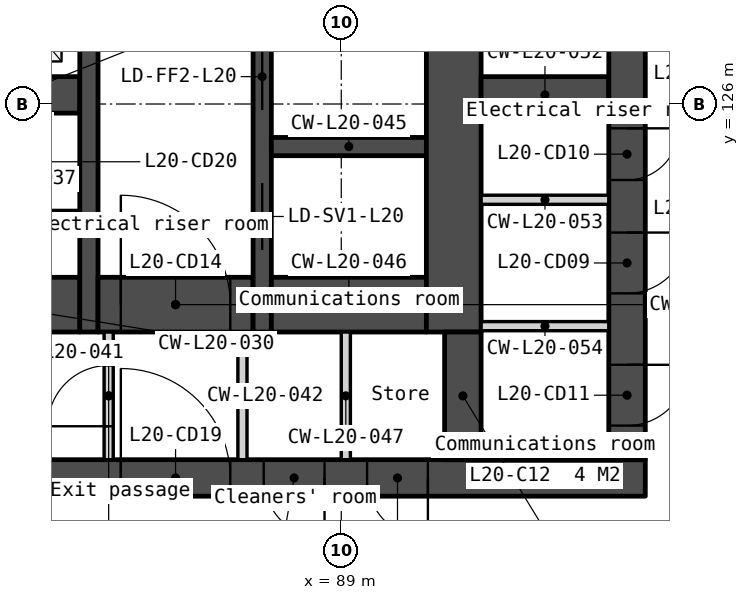
"""IFC4 building model, lengths in metres.
Left out: names, types, materials, properties, quantities, classifications, styles, units other than length and angle.
Written with IfcOpenShell. Run it as: python <this file> out.ifc"""

import sys

from ifc_helpers import new_model, si_unit, direction, frame, frame_2d, origin, place, context, subcontext, project, spatial, polyline, rectangle, outline, extrude, element, fill, save


model = new_model("IFC4")
c1 = context("Model", 3, precision=1e-05, world=origin(), true_north=direction((0.0, 1.0)))
c2 = subcontext(c1, "Body", "Model", "MODEL_VIEW")
j1 = project(units=[si_unit("LENGTHUNIT", "METRE"), si_unit("PLANEANGLEUNIT", "RADIAN")], contexts=[c1])
p1 = place(None, origin())
s1 = spatial("IfcSite", under=j1, at=p1, CompositionType="ELEMENT")
p2 = place(p1, origin())
s2 = spatial("IfcBuilding", under=s1, at=p2, CompositionType="ELEMENT")
p3 = place(p2, frame((0.0, 0.0, 85.3)))
s3 = spatial("IfcBuildingStorey", under=s2, at=p3, CompositionType="ELEMENT", Elevation=85.3)
p4 = place(p3, frame((66.0, 119.85, 0.0), z_axis=(0.0, 0.0, 1.0), x_axis=(1.0, 0.0, 0.0)))
e1 = element("IfcWall", 1, at=p4, inside=s3, PredefinedType="SOLIDWALL", context=c2, shape_type="SweptSolid", body=[
    extrude(rectangle(XDim=28.0, YDim=0.6, at=frame_2d((14.0, 0.0))), origin(), (0.0, 0.0, 1.0), 3.35),
])
p5 = place(p4, frame((6.825, 0.0, 0.0)))
e2 = element("IfcOpeningElement", 2, at=p5, cuts=e1, PredefinedType="OPENING", context=c2, shape_type="SweptSolid", body=[
    extrude(rectangle(XDim=1.8, YDim=2.1, at=frame_2d((0.9, 1.05))), frame((0.0, 0.31, 0.0), z_axis=(0.0, -1.0, 0.0), x_axis=(1.0, 0.0, 0.0)), (0.0, 0.0, 1.0), 0.62),
])
p6 = place(p4, frame((15.85, 0.0, 0.0)))
e3 = element("IfcOpeningElement", 3, at=p6, cuts=e1, PredefinedType="OPENING", context=c2, shape_type="SweptSolid", body=[
    extrude(rectangle(XDim=1.5, YDim=2.1, at=frame_2d((0.75, 1.05))), frame((0.0, 0.31, 0.0), z_axis=(0.0, -1.0, 0.0), x_axis=(1.0, 0.0, 0.0)), (0.0, 0.0, 1.0), 0.62),
])
p7 = place(p4, frame((19.375, 0.0, 0.0)))
e4 = element("IfcOpeningElement", 4, at=p7, cuts=e1, PredefinedType="OPENING", context=c2, shape_type="SweptSolid", body=[
    extrude(rectangle(XDim=1.8, YDim=2.1, at=frame_2d((0.9, 1.05))), frame((0.0, 0.31, 0.0), z_axis=(0.0, -1.0, 0.0), x_axis=(1.0, 0.0, 0.0)), (0.0, 0.0, 1.0), 0.62),
])
p8 = place(p4, frame((4.425, 0.0, 0.0)))
e5 = element("IfcOpeningElement", 5, at=p8, cuts=e1, PredefinedType="OPENING", context=c2, shape_type="SweptSolid", body=[
    extrude(rectangle(XDim=1.0, YDim=2.1, at=frame_2d((0.5, 1.05))), frame((0.0, 0.31, 0.0), z_axis=(0.0, -1.0, 0.0), x_axis=(1.0, 0.0, 0.0)), (0.0, 0.0, 1.0), 0.62),
])
p9 = place(p4, frame((9.783, 0.0, 0.0)))
e6 = element("IfcOpeningElement", 6, at=p9, cuts=e1, PredefinedType="OPENING", context=c2, shape_type="SweptSolid", body=[
    extrude(rectangle(XDim=1.0, YDim=2.1, at=frame_2d((0.5, 1.05))), frame((0.0, 0.31, 0.0), z_axis=(0.0, -1.0, 0.0), x_axis=(1.0, 0.0, 0.0)), (0.0, 0.0, 1.0), 0.62),
])
p10 = place(p4, frame((11.525, 0.0, 0.0)))
e7 = element("IfcOpeningElement", 7, at=p10, cuts=e1, PredefinedType="OPENING", context=c2, shape_type="SweptSolid", body=[
    extrude(rectangle(XDim=1.0, YDim=2.1, at=frame_2d((0.5, 1.05))), frame((0.0, 0.31, 0.0), z_axis=(0.0, -1.0, 0.0), x_axis=(1.0, 0.0, 0.0)), (0.0, 0.0, 1.0), 0.62),
])
p11 = place(p4, frame((13.658, 0.0, 0.0)))
e8 = element("IfcOpeningElement", 8, at=p11, cuts=e1, PredefinedType="OPENING", context=c2, shape_type="SweptSolid", body=[
    extrude(rectangle(XDim=1.0, YDim=2.1, at=frame_2d((0.5, 1.05))), frame((0.0, 0.31, 0.0), z_axis=(0.0, -1.0, 0.0), x_axis=(1.0, 0.0, 0.0)), (0.0, 0.0, 1.0), 0.62),
])
p12 = place(p4, frame((21.725, 0.0, 0.0)))
e9 = element("IfcOpeningElement", 9, at=p12, cuts=e1, PredefinedType="OPENING", context=c2, shape_type="SweptSolid", body=[
    extrude(rectangle(XDim=1.0, YDim=2.1, at=frame_2d((0.5, 1.05))), frame((0.0, 0.31, 0.0), z_axis=(0.0, -1.0, 0.0), x_axis=(1.0, 0.0, 0.0)), (0.0, 0.0, 1.0), 0.62),
])
p13 = place(p4, frame((23.425, 0.0, 0.0)))
e10 = element("IfcOpeningElement", 10, at=p13, cuts=e1, PredefinedType="OPENING", context=c2, shape_type="SweptSolid", body=[
    extrude(rectangle(XDim=1.0, YDim=2.1, at=frame_2d((0.5, 1.05))), frame((0.0, 0.31, 0.0), z_axis=(0.0, -1.0, 0.0), x_axis=(1.0, 0.0, 0.0)), (0.0, 0.0, 1.0), 0.62),
])
p14 = place(p3, frame((81.8, 122.7, 0.0), z_axis=(0.0, 0.0, 1.0), x_axis=(1.0, 0.0, 0.0)))
e11 = element("IfcWall", 11, at=p14, inside=s3, PredefinedType="SOLIDWALL", context=c2, shape_type="SweptSolid", body=[
    extrude(rectangle(XDim=2.9, YDim=0.9, at=frame_2d((1.45, 0.0))), origin(), (0.0, 0.0, 1.0), 3.35),
])
p15 = place(p14, frame((0.05, 0.0, 0.0)))
e12 = element("IfcOpeningElement", 12, at=p15, cuts=e11, PredefinedType="OPENING", context=c2, shape_type="SweptSolid", body=[
    extrude(rectangle(XDim=1.5, YDim=2.1, at=frame_2d((0.75, 1.05))), frame((0.0, 0.46, 0.0), z_axis=(0.0, -1.0, 0.0), x_axis=(1.0, 0.0, 0.0)), (0.0, 0.0, 1.0), 0.92),
])
p16 = place(p3, frame((82.6, 126.15, 0.0), z_axis=(0.0, 0.0, 1.0), x_axis=(1.0, 0.0, 0.0)))
e13 = element("IfcWall", 13, at=p16, inside=s3, PredefinedType="SOLIDWALL", context=c2, shape_type="SweptSolid", body=[
    extrude(rectangle(XDim=2.1, YDim=0.6, at=frame_2d((1.05, 0.0))), origin(), (0.0, 0.0, 1.0), 3.35),
])
p17 = place(p3, frame((83.35, 124.175, 0.0), z_axis=(0.0, 0.0, 1.0), x_axis=(1.0, 0.0, 0.0)))
e14 = element("IfcWall", 14, at=p17, inside=s3, PredefinedType="PARTITIONING", context=c2, shape_type="SweptSolid", body=[
    extrude(rectangle(XDim=1.35, YDim=0.15, at=frame_2d((0.675, 0.0))), origin(), (0.0, 0.0, 1.0), 3.35),
])
p18 = place(p3, frame((84.85, 133.95, 0.0), z_axis=(0.0, 0.0, 1.0), x_axis=(0.0, -1.0, 0.0)))
e15 = element("IfcWall", 15, at=p18, inside=s3, PredefinedType="SOLIDWALL", context=c2, shape_type="SweptSolid", body=[
    extrude(rectangle(XDim=11.7, YDim=0.3, at=frame_2d((5.85, 0.0))), origin(), (0.0, 0.0, 1.0), 3.35),
])
p19 = place(p3, frame((85.0, 122.7, 0.0), z_axis=(0.0, 0.0, 1.0), x_axis=(1.0, 0.0, 0.0)))
e16 = element("IfcWall", 16, at=p19, inside=s3, PredefinedType="SOLIDWALL", context=c2, shape_type="SweptSolid", body=[
    extrude(rectangle(XDim=2.55, YDim=0.9, at=frame_2d((1.275, 0.0))), origin(), (0.0, 0.0, 1.0), 3.35),
])
p20 = place(p19, frame((0.375, 0.0, 0.0)))
e17 = element("IfcOpeningElement", 17, at=p20, cuts=e16, PredefinedType="OPENING", context=c2, shape_type="SweptSolid", body=[
    extrude(rectangle(XDim=1.8, YDim=2.1, at=frame_2d((0.9, 1.05))), frame((0.0, 0.46, 0.0), z_axis=(0.0, -1.0, 0.0), x_axis=(1.0, 0.0, 0.0)), (0.0, 0.0, 1.0), 0.92),
])
p21 = place(p3, frame((85.175, 122.25, 0.0), z_axis=(0.0, 0.0, 1.0), x_axis=(0.0, -1.0, 0.0)))
e18 = element("IfcWall", 18, at=p21, inside=s3, PredefinedType="PARTITIONING", context=c2, shape_type="SweptSolid", body=[
    extrude(rectangle(XDim=2.1, YDim=0.15, at=frame_2d((1.05, 0.0))), origin(), (0.0, 0.0, 1.0), 3.35),
])
p22 = place(p21, frame((0.55, 0.0, 0.0)))
e19 = element("IfcOpeningElement", 19, at=p22, cuts=e18, PredefinedType="OPENING", context=c2, shape_type="SweptSolid", body=[
    extrude(rectangle(XDim=1.0, YDim=2.1, at=frame_2d((0.5, 1.05))), frame((0.0, 0.085, 0.0), z_axis=(0.0, -1.0, 0.0), x_axis=(1.0, 0.0, 0.0)), (0.0, 0.0, 1.0), 0.17),
])
p23 = place(p3, frame((87.375, 122.25, 0.0), z_axis=(0.0, 0.0, 1.0), x_axis=(0.0, -1.0, 0.0)))
e20 = element("IfcWall", 20, at=p23, inside=s3, PredefinedType="PARTITIONING", context=c2, shape_type="SweptSolid", body=[
    extrude(rectangle(XDim=2.1, YDim=0.15, at=frame_2d((1.05, 0.0))), origin(), (0.0, 0.0, 1.0), 3.35),
])
p24 = place(p3, frame((87.7, 133.95, 0.0), z_axis=(0.0, 0.0, 1.0), x_axis=(0.0, -1.0, 0.0)))
e21 = element("IfcWall", 21, at=p24, inside=s3, PredefinedType="SOLIDWALL", context=c2, shape_type="SweptSolid", body=[
    extrude(rectangle(XDim=11.7, YDim=0.3, at=frame_2d((5.85, 0.0))), origin(), (0.0, 0.0, 1.0), 3.35),
])
p25 = place(p24, frame((6.95, 0.0, 0.0)))
e22 = element("IfcOpeningElement", 22, at=p25, cuts=e21, PredefinedType="OPENING", context=c2, shape_type="SweptSolid", body=[
    extrude(rectangle(XDim=1.1, YDim=2.1, at=frame_2d((0.55, 1.05))), frame((0.0, 0.16, 0.0), z_axis=(0.0, -1.0, 0.0), x_axis=(1.0, 0.0, 0.0)), (0.0, 0.0, 1.0), 0.32),
])
p26 = place(p24, frame((5.1, 0.0, 0.0)))
e23 = element("IfcOpeningElement", 23, at=p26, cuts=e21, PredefinedType="OPENING", context=c2, shape_type="SweptSolid", body=[
    extrude(rectangle(XDim=1.0, YDim=2.1, at=frame_2d((0.5, 1.05))), frame((0.0, 0.16, 0.0), z_axis=(0.0, -1.0, 0.0), x_axis=(1.0, 0.0, 0.0)), (0.0, 0.0, 1.0), 0.32),
])
p27 = place(p24, frame((9.25, 0.0, 0.0)))
e24 = element("IfcOpeningElement", 24, at=p27, cuts=e21, PredefinedType="OPENING", context=c2, shape_type="SweptSolid", body=[
    extrude(rectangle(XDim=1.1, YDim=2.1, at=frame_2d((0.55, 1.05))), frame((0.0, 0.16, 0.0), z_axis=(0.0, -1.0, 0.0), x_axis=(1.0, 0.0, 0.0)), (0.0, 0.0, 1.0), 0.32),
])
p28 = place(p3, frame((87.85, 125.3, 0.0), z_axis=(0.0, 0.0, 1.0), x_axis=(1.0, 0.0, 0.0)))
e25 = element("IfcWall", 25, at=p28, inside=s3, PredefinedType="SOLIDWALL", context=c2, shape_type="SweptSolid", body=[
    extrude(rectangle(XDim=2.55, YDim=0.3, at=frame_2d((1.275, 0.0))), origin(), (0.0, 0.0, 1.0), 3.35),
])
p29 = place(p3, frame((87.85, 122.7, 0.0), z_axis=(0.0, 0.0, 1.0), x_axis=(1.0, 0.0, 0.0)))
e26 = element("IfcWall", 26, at=p29, inside=s3, PredefinedType="SOLIDWALL", context=c2, shape_type="SweptSolid", body=[
    extrude(rectangle(XDim=2.55, YDim=0.9, at=frame_2d((1.275, 0.0))), origin(), (0.0, 0.0, 1.0), 3.35),
])
p30 = place(p3, frame((89.075, 122.25, 0.0), z_axis=(0.0, 0.0, 1.0), x_axis=(0.0, -1.0, 0.0)))
e27 = element("IfcWall", 27, at=p30, inside=s3, PredefinedType="PARTITIONING", context=c2, shape_type="SweptSolid", body=[
    extrude(rectangle(XDim=2.1, YDim=0.15, at=frame_2d((1.05, 0.0))), origin(), (0.0, 0.0, 1.0), 3.35),
])
p31 = place(p3, frame((90.85, 133.95, 0.0), z_axis=(0.0, 0.0, 1.0), x_axis=(0.0, -1.0, 0.0)))
e28 = element("IfcWall", 28, at=p31, inside=s3, PredefinedType="SOLIDWALL", context=c2, shape_type="SweptSolid", body=[
    extrude(rectangle(XDim=11.7, YDim=0.9, at=frame_2d((5.85, 0.0))), origin(), (0.0, 0.0, 1.0), 3.35),
])
p32 = place(p3, frame((91.0, 122.25, 0.0), z_axis=(0.0, 0.0, 1.0), x_axis=(0.0, -1.0, 0.0)))
e29 = element("IfcWall", 29, at=p32, inside=s3, PredefinedType="SOLIDWALL", context=c2, shape_type="SweptSolid", body=[
    extrude(rectangle(XDim=2.1, YDim=0.6, at=frame_2d((1.05, 0.0))), origin(), (0.0, 0.0, 1.0), 3.35),
])
p33 = place(p3, frame((91.3, 126.15, 0.0), z_axis=(0.0, 0.0, 1.0), x_axis=(1.0, 0.0, 0.0)))
e30 = element("IfcWall", 30, at=p33, inside=s3, PredefinedType="SOLIDWALL", context=c2, shape_type="SweptSolid", body=[
    extrude(rectangle(XDim=2.1, YDim=0.6, at=frame_2d((1.05, 0.0))), origin(), (0.0, 0.0, 1.0), 3.35),
])
for number, where, z_axis, x_axis in (
    (31, (91.3, 124.425, 0.0), (0.0, 0.0, 1.0), (1.0, 0.0, 0.0)),
    (32, (91.3, 122.346, 0.0), (0.0, 0.0, 1.0), (1.0, 0.0, 0.0)),
):
    element("IfcWall", number, at=place(p3, frame(where, z_axis=z_axis, x_axis=x_axis)), inside=s3, PredefinedType="PARTITIONING", context=c2, shape_type="SweptSolid", body=[
        extrude(rectangle(XDim=2.1, YDim=0.15, at=frame_2d((1.05, 0.0))), origin(), (0.0, 0.0, 1.0), 3.35),
    ])
p34 = place(p3, frame((93.7, 133.95, 0.0), z_axis=(0.0, 0.0, 1.0), x_axis=(0.0, -1.0, 0.0)))
e33 = element("IfcWall", 33, at=p34, inside=s3, PredefinedType="SOLIDWALL", context=c2, shape_type="SweptSolid", body=[
    extrude(rectangle(XDim=13.8, YDim=0.6, at=frame_2d((6.9, 0.0))), origin(), (0.0, 0.0, 1.0), 3.35),
])
p35 = place(p34, frame((0.6, 0.0, 0.0)))
e34 = element("IfcOpeningElement", 34, at=p35, cuts=e33, PredefinedType="OPENING", context=c2, shape_type="SweptSolid", body=[
    extrude(rectangle(XDim=1.1, YDim=2.1, at=frame_2d((0.55, 1.05))), frame((0.0, 0.31, 0.0), z_axis=(0.0, -1.0, 0.0), x_axis=(1.0, 0.0, 0.0)), (0.0, 0.0, 1.0), 0.62),
])
p36 = place(p34, frame((10.064, 0.0, 0.0)))
e35 = element("IfcOpeningElement", 35, at=p36, cuts=e33, PredefinedType="OPENING", context=c2, shape_type="SweptSolid", body=[
    extrude(rectangle(XDim=1.0, YDim=2.1, at=frame_2d((0.5, 1.05))), frame((0.0, 0.31, 0.0), z_axis=(0.0, -1.0, 0.0), x_axis=(1.0, 0.0, 0.0)), (0.0, 0.0, 1.0), 0.62),
])
p37 = place(p34, frame((8.35, 0.0, 0.0)))
e36 = element("IfcOpeningElement", 36, at=p37, cuts=e33, PredefinedType="OPENING", context=c2, shape_type="SweptSolid", body=[
    extrude(rectangle(XDim=0.85, YDim=2.1, at=frame_2d((0.425, 1.05))), frame((0.0, 0.31, 0.0), z_axis=(0.0, -1.0, 0.0), x_axis=(1.0, 0.0, 0.0)), (0.0, 0.0, 1.0), 0.62),
])
p38 = place(p34, frame((12.239, 0.0, 0.0)))
e37 = element("IfcOpeningElement", 37, at=p38, cuts=e33, PredefinedType="OPENING", context=c2, shape_type="SweptSolid", body=[
    extrude(rectangle(XDim=1.0, YDim=2.1, at=frame_2d((0.5, 1.05))), frame((0.0, 0.31, 0.0), z_axis=(0.0, -1.0, 0.0), x_axis=(1.0, 0.0, 0.0)), (0.0, 0.0, 1.0), 0.62),
])
p39 = place(p3, frame((82.605, 93.333, -0.15), z_axis=(0.0, 0.0, 1.0), x_axis=(0.500000478905, 0.866025127289, 0.0)))
e38 = element("IfcWall", 38, at=p39, inside=s3, PredefinedType="SOLIDWALL", context=c2, shape_type="SweptSolid", body=[
    extrude(outline(polyline([(42.643, 0.0), (42.643, 3.5), (0.0, 3.5), (0.0, 0.0), (42.643, 0.0)])), frame((0.0, 0.225, 0.0), z_axis=(0.0, -1.0, 0.0), x_axis=(1.0, 0.0, 0.0)), (0.0, 0.0, 1.0), 0.45),
])
p40 = place(p39, frame((7.079, 0.0, 1.05)))
e39 = element("IfcOpeningElement", 39, at=p40, cuts=e38, PredefinedType="OPENING", context=c2, shape_type="SweptSolid", body=[
    extrude(rectangle(XDim=1.2, YDim=1.5, at=frame_2d((0.6, 0.75))), frame((0.0, 0.235, 0.0), z_axis=(0.0, -1.0, 0.0), x_axis=(1.0, 0.0, 0.0)), (0.0, 0.0, 1.0), 0.47),
])
p41 = place(p39, frame((8.779, 0.0, 1.05)))
e40 = element("IfcOpeningElement", 40, at=p41, cuts=e38, PredefinedType="OPENING", context=c2, shape_type="SweptSolid", body=[
    extrude(rectangle(XDim=1.2, YDim=1.5, at=frame_2d((0.6, 0.75))), frame((0.0, 0.235, 0.0), z_axis=(0.0, -1.0, 0.0), x_axis=(1.0, 0.0, 0.0)), (0.0, 0.0, 1.0), 0.47),
])
p42 = place(p39, frame((15.607, 0.0, 1.05)))
e41 = element("IfcOpeningElement", 41, at=p42, cuts=e38, PredefinedType="OPENING", context=c2, shape_type="SweptSolid", body=[
    extrude(rectangle(XDim=1.2, YDim=1.5, at=frame_2d((0.6, 0.75))), frame((0.0, 0.235, 0.0), z_axis=(0.0, -1.0, 0.0), x_axis=(1.0, 0.0, 0.0)), (0.0, 0.0, 1.0), 0.47),
])
p43 = place(p39, frame((17.307, 0.0, 1.05)))
e42 = element("IfcOpeningElement", 42, at=p43, cuts=e38, PredefinedType="OPENING", context=c2, shape_type="SweptSolid", body=[
    extrude(rectangle(XDim=1.2, YDim=1.5, at=frame_2d((0.6, 0.75))), frame((0.0, 0.235, 0.0), z_axis=(0.0, -1.0, 0.0), x_axis=(1.0, 0.0, 0.0)), (0.0, 0.0, 1.0), 0.47),
])
p44 = place(p39, frame((24.136, 0.0, 1.05)))
e43 = element("IfcOpeningElement", 43, at=p44, cuts=e38, PredefinedType="OPENING", context=c2, shape_type="SweptSolid", body=[
    extrude(rectangle(XDim=1.2, YDim=1.5, at=frame_2d((0.6, 0.75))), frame((0.0, 0.235, 0.0), z_axis=(0.0, -1.0, 0.0), x_axis=(1.0, 0.0, 0.0)), (0.0, 0.0, 1.0), 0.47),
])
p45 = place(p39, frame((25.836, 0.0, 1.05)))
e44 = element("IfcOpeningElement", 44, at=p45, cuts=e38, PredefinedType="OPENING", context=c2, shape_type="SweptSolid", body=[
    extrude(rectangle(XDim=1.2, YDim=1.5, at=frame_2d((0.6, 0.75))), frame((0.0, 0.235, 0.0), z_axis=(0.0, -1.0, 0.0), x_axis=(1.0, 0.0, 0.0)), (0.0, 0.0, 1.0), 0.47),
])
p46 = place(p39, frame((32.665, 0.0, 1.05)))
e45 = element("IfcOpeningElement", 45, at=p46, cuts=e38, PredefinedType="OPENING", context=c2, shape_type="SweptSolid", body=[
    extrude(rectangle(XDim=1.2, YDim=1.5, at=frame_2d((0.6, 0.75))), frame((0.0, 0.235, 0.0), z_axis=(0.0, -1.0, 0.0), x_axis=(1.0, 0.0, 0.0)), (0.0, 0.0, 1.0), 0.47),
])
p47 = place(p39, frame((34.365, 0.0, 1.05)))
e46 = element("IfcOpeningElement", 46, at=p47, cuts=e38, PredefinedType="OPENING", context=c2, shape_type="SweptSolid", body=[
    extrude(rectangle(XDim=1.2, YDim=1.5, at=frame_2d((0.6, 0.75))), frame((0.0, 0.235, 0.0), z_axis=(0.0, -1.0, 0.0), x_axis=(1.0, 0.0, 0.0)), (0.0, 0.0, 1.0), 0.47),
])
p48 = place(p36, origin())
e47 = element("IfcDoor", 47, at=p48, inside=s3, OperationType="SINGLE_SWING_LEFT", PredefinedType="DOOR", context=c2, shape_type="SweptSolid", body=[
    extrude(rectangle(XDim=1.0, YDim=2.1, at=frame_2d((0.5, 1.05))), frame((0.0, 0.025, 0.0), z_axis=(0.0, -1.0, 0.0), x_axis=(1.0, 0.0, 0.0)), (0.0, 0.0, 1.0), 0.05),
])
fill(e35, e47)
p49 = place(p37, origin())
e48 = element("IfcDoor", 48, at=p49, inside=s3, OperationType="SINGLE_SWING_LEFT", PredefinedType="DOOR", context=c2, shape_type="SweptSolid", body=[
    extrude(rectangle(XDim=0.85, YDim=2.1, at=frame_2d((0.425, 1.05))), frame((0.0, 0.025, 0.0), z_axis=(0.0, -1.0, 0.0), x_axis=(1.0, 0.0, 0.0)), (0.0, 0.0, 1.0), 0.05),
])
fill(e36, e48)
p50 = place(p38, origin())
e49 = element("IfcDoor", 49, at=p50, inside=s3, OperationType="SINGLE_SWING_LEFT", PredefinedType="DOOR", context=c2, shape_type="SweptSolid", body=[
    extrude(rectangle(XDim=1.0, YDim=2.1, at=frame_2d((0.5, 1.05))), frame((0.0, 0.025, 0.0), z_axis=(0.0, -1.0, 0.0), x_axis=(1.0, 0.0, 0.0)), (0.0, 0.0, 1.0), 0.05),
])
fill(e37, e49)
p51 = place(p25, origin())
e50 = element("IfcDoor", 50, at=p51, inside=s3, OperationType="SLIDING_TO_LEFT", PredefinedType="DOOR", context=c2, shape_type="SweptSolid", body=[
    extrude(rectangle(XDim=1.1, YDim=2.1, at=frame_2d((0.55, 1.05))), frame((0.0, 0.025, 0.0), z_axis=(0.0, -1.0, 0.0), x_axis=(1.0, 0.0, 0.0)), (0.0, 0.0, 1.0), 0.05),
])
fill(e22, e50)
p52 = place(p20, origin())
e51 = element("IfcDoor", 51, at=p52, inside=s3, OperationType="DOUBLE_DOOR_DOUBLE_SWING", PredefinedType="DOOR", context=c2, shape_type="SweptSolid", body=[
    extrude(rectangle(XDim=1.8, YDim=2.1, at=frame_2d((0.9, 1.05))), frame((0.0, 0.025, 0.0), z_axis=(0.0, -1.0, 0.0), x_axis=(1.0, 0.0, 0.0)), (0.0, 0.0, 1.0), 0.05),
])
fill(e17, e51)
p53 = place(p7, origin())
e52 = element("IfcDoor", 52, at=p53, inside=s3, OperationType="DOUBLE_DOOR_DOUBLE_SWING", PredefinedType="DOOR", context=c2, shape_type="SweptSolid", body=[
    extrude(rectangle(XDim=1.8, YDim=2.1, at=frame_2d((0.9, 1.05))), frame((0.0, 0.025, 0.0), z_axis=(0.0, -1.0, 0.0), x_axis=(1.0, 0.0, 0.0)), (0.0, 0.0, 1.0), 0.05),
])
fill(e4, e52)
p54 = place(p22, origin())
e53 = element("IfcDoor", 53, at=p54, inside=s3, OperationType="SINGLE_SWING_RIGHT", PredefinedType="DOOR", context=c2, shape_type="SweptSolid", body=[
    extrude(rectangle(XDim=1.0, YDim=2.1, at=frame_2d((0.5, 1.05))), frame((0.0, 0.025, 0.0), z_axis=(0.0, -1.0, 0.0), x_axis=(1.0, 0.0, 0.0)), (0.0, 0.0, 1.0), 0.05),
])
fill(e19, e53)
p55 = place(p12, origin())
e54 = element("IfcDoor", 54, at=p55, inside=s3, OperationType="SINGLE_SWING_RIGHT", PredefinedType="DOOR", context=c2, shape_type="SweptSolid", body=[
    extrude(rectangle(XDim=1.0, YDim=2.1, at=frame_2d((0.5, 1.05))), frame((0.0, 0.025, 0.0), z_axis=(0.0, -1.0, 0.0), x_axis=(1.0, 0.0, 0.0)), (0.0, 0.0, 1.0), 0.05),
])
fill(e9, e54)
p56 = place(p13, origin())
e55 = element("IfcDoor", 55, at=p56, inside=s3, OperationType="SINGLE_SWING_RIGHT", PredefinedType="DOOR", context=c2, shape_type="SweptSolid", body=[
    extrude(rectangle(XDim=1.0, YDim=2.1, at=frame_2d((0.5, 1.05))), frame((0.0, 0.025, 0.0), z_axis=(0.0, -1.0, 0.0), x_axis=(1.0, 0.0, 0.0)), (0.0, 0.0, 1.0), 0.05),
])
fill(e10, e55)
p57 = place(p27, origin())
e56 = element("IfcDoor", 56, at=p57, inside=s3, OperationType="SLIDING_TO_LEFT", PredefinedType="DOOR", context=c2, shape_type="SweptSolid", body=[
    extrude(rectangle(XDim=1.1, YDim=2.1, at=frame_2d((0.55, 1.05))), frame((0.0, 0.025, 0.0), z_axis=(0.0, -1.0, 0.0), x_axis=(1.0, 0.0, 0.0)), (0.0, 0.0, 1.0), 0.05),
])
fill(e24, e56)
save(model, sys.argv[1])
